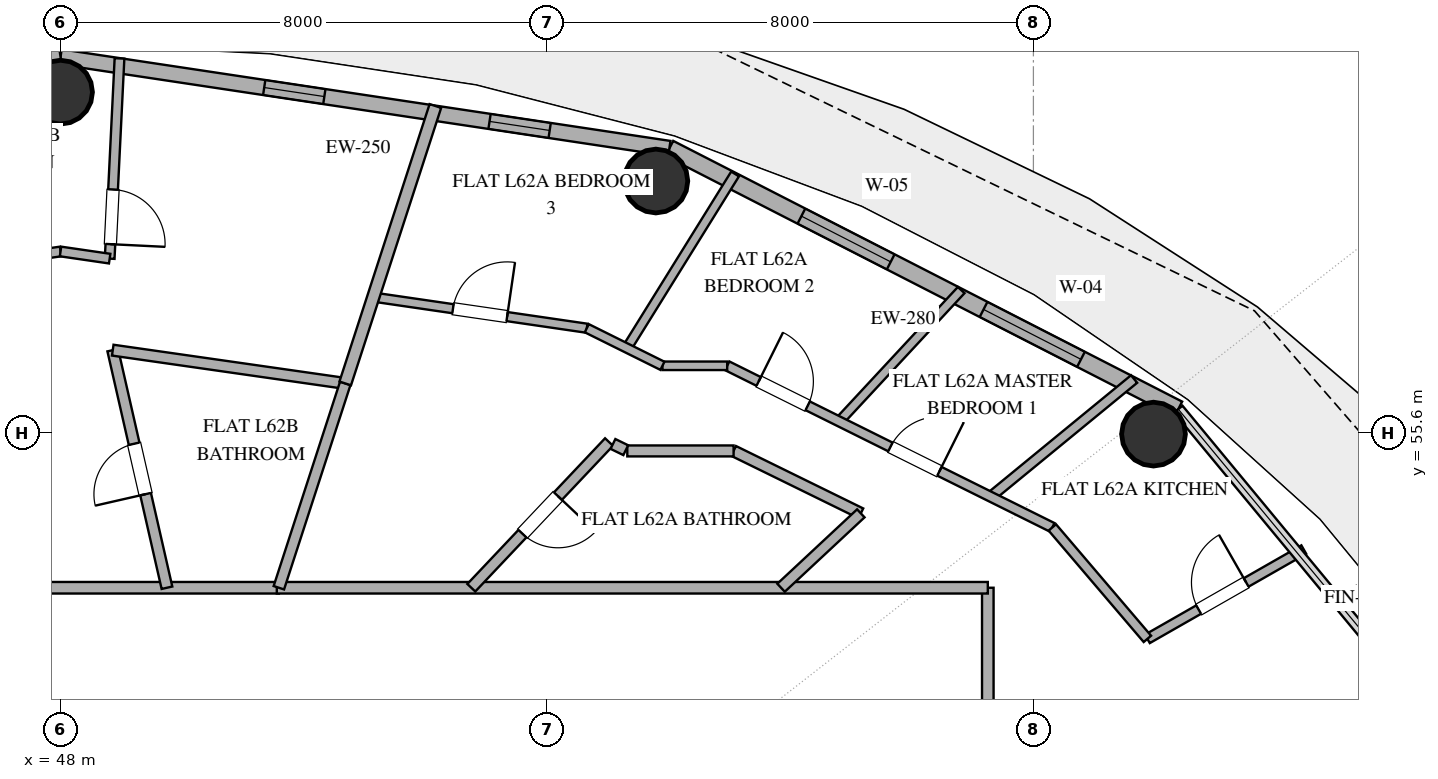
"""IFC4 building model, lengths in metres.
Left out: names, types, materials, properties, quantities, classifications, styles, units other than length and angle.
Written with IfcOpenShell. Run it as: python <this file> out.ifc"""

import sys

from ifc_helpers import new_model, si_unit, direction, frame, frame_2d, origin, origin_2d, place, context, subcontext, project, spatial, rectangle, hollow_circle, extrude, element, fill, save


model = new_model("IFC4")
c1 = context("Model", 3, precision=1e-05, world=origin(), true_north=direction((0.0, 1.0)))
c2 = subcontext(c1, "Body", "Model", "MODEL_VIEW")
j1 = project(units=[si_unit("LENGTHUNIT", "METRE"), si_unit("PLANEANGLEUNIT", "RADIAN")], contexts=[c1])
p1 = place(None, origin())
s1 = spatial("IfcSite", under=j1, at=p1, CompositionType="ELEMENT")
p2 = place(p1, origin())
s2 = spatial("IfcBuilding", under=s1, at=p2, CompositionType="ELEMENT")
p3 = place(p2, frame((0.0, 0.0, 242.4)))
s3 = spatial("IfcBuildingStorey", under=s2, at=p3, CompositionType="ELEMENT", Elevation=242.4)
for number, where, z_axis, x_axis in (
    (1, (65.975, 55.576, 0.0), (0.0, 0.0, 1.0), (1.0, 0.0, 0.0)),
    (2, (57.791, 59.739, 0.0), (0.0, 0.0, 1.0), (1.0, 0.0, 0.0)),
    (3, (48.0, 61.2, 0.0), (0.0, 0.0, 1.0), (1.0, 0.0, 0.0)),
):
    element("IfcColumn", number, at=place(p3, frame(where, z_axis=z_axis, x_axis=x_axis)), inside=s3, PredefinedType="COLUMN", context=c2, shape_type="SweptSolid", body=[
        extrude(hollow_circle(Radius=0.525, WallThickness=0.028, at=origin_2d()), origin(), (0.0, 0.0, 1.0), 3.36),
    ])
p4 = place(p3, frame((66.383, 55.987, 0.0), z_axis=(0.0, 0.0, 1.0), x_axis=(-0.890007394051, 0.455946091699, 0.0)))
e4 = element("IfcWall", 4, at=p4, inside=s3, PredefinedType="SOLIDWALL", context=c2, shape_type="SweptSolid", body=[
    extrude(rectangle(XDim=9.404, YDim=0.28, at=frame_2d((4.702, 0.0))), origin(), (0.0, 0.0, 1.0), 3.36),
])
p5 = place(p4, frame((1.798, 0.0, 0.85)))
e5 = element("IfcOpeningElement", 5, at=p5, cuts=e4, PredefinedType="OPENING", context=c2, shape_type="SweptSolid", body=[
    extrude(rectangle(XDim=1.8, YDim=2.2, at=frame_2d((0.9, 1.1))), frame((0.0, 0.15, 0.0), z_axis=(0.0, -1.0, 0.0), x_axis=(1.0, 0.0, 0.0)), (0.0, 0.0, 1.0), 0.3),
])
p6 = place(p4, frame((5.314, 0.0, 0.85)))
e6 = element("IfcOpeningElement", 6, at=p6, cuts=e4, PredefinedType="OPENING", context=c2, shape_type="SweptSolid", body=[
    extrude(rectangle(XDim=1.65, YDim=2.0, at=frame_2d((0.825, 1.0))), frame((0.0, 0.15, 0.0), z_axis=(0.0, -1.0, 0.0), x_axis=(1.0, 0.0, 0.0)), (0.0, 0.0, 1.0), 0.3),
])
p7 = place(p3, frame((58.013, 60.274, 0.0), z_axis=(0.0, 0.0, 1.0), x_axis=(-0.988882522213, 0.148698881169, 0.0)))
e7 = element("IfcWall", 7, at=p7, inside=s3, PredefinedType="SOLIDWALL", context=c2, shape_type="SweptSolid", body=[
    extrude(rectangle(XDim=10.125, YDim=0.25, at=frame_2d((5.062, 0.0))), origin(), (0.0, 0.0, 1.0), 3.36),
])
p8 = place(p7, frame((1.99, 0.0, 1.42)))
e8 = element("IfcOpeningElement", 8, at=p8, cuts=e7, PredefinedType="OPENING", context=c2, shape_type="SweptSolid", body=[
    extrude(rectangle(XDim=1.0, YDim=1.05, at=frame_2d((0.5, 0.525))), frame((0.0, 0.135, 0.0), z_axis=(0.0, -1.0, 0.0), x_axis=(1.0, 0.0, 0.0)), (0.0, 0.0, 1.0), 0.27),
])
p9 = place(p7, frame((5.738, 0.0, 0.35)))
e9 = element("IfcOpeningElement", 9, at=p9, cuts=e7, PredefinedType="OPENING", context=c2, shape_type="SweptSolid", body=[
    extrude(rectangle(XDim=1.0, YDim=1.05, at=frame_2d((0.5, 0.525))), frame((0.0, 0.135, 0.0), z_axis=(0.0, -1.0, 0.0), x_axis=(1.0, 0.0, 0.0)), (0.0, 0.0, 1.0), 0.27),
])
p10 = place(p3, frame((48.0, 61.78, 0.0), z_axis=(0.0, 0.0, 1.0), x_axis=(-0.988882522213, -0.148698881169, 0.0)))
e10 = element("IfcWall", 10, at=p10, inside=s3, PredefinedType="SOLIDWALL", context=c2, shape_type="SweptSolid", body=[
    extrude(rectangle(XDim=10.125, YDim=0.28, at=frame_2d((5.062, 0.0))), origin(), (0.0, 0.0, 1.0), 3.36),
])
p11 = place(p10, frame((2.769, 0.0, 0.85)))
e11 = element("IfcOpeningElement", 11, at=p11, cuts=e10, PredefinedType="OPENING", context=c2, shape_type="SweptSolid", body=[
    extrude(rectangle(XDim=1.5, YDim=2.0, at=frame_2d((0.75, 1.0))), frame((0.0, 0.15, 0.0), z_axis=(0.0, -1.0, 0.0), x_axis=(1.0, 0.0, 0.0)), (0.0, 0.0, 1.0), 0.3),
])
p12 = place(p10, frame((7.28, 0.0, 0.0)))
e12 = element("IfcOpeningElement", 12, at=p12, cuts=e10, PredefinedType="OPENING", context=c2, shape_type="SweptSolid", body=[
    extrude(rectangle(XDim=1.05, YDim=2.2, at=frame_2d((0.525, 1.1))), frame((0.0, 0.15, 0.0), z_axis=(0.0, -1.0, 0.0), x_axis=(1.0, 0.0, 0.0)), (0.0, 0.0, 1.0), 0.3),
])
p13 = place(p3, frame((32.75, 53.05, 0.0), z_axis=(0.0, 0.0, 1.0), x_axis=(1.0, 0.0, 0.0)))
e13 = element("IfcWall", 13, at=p13, inside=s3, PredefinedType="PARTITIONING", context=c2, shape_type="SweptSolid", body=[
    extrude(rectangle(XDim=18.84, YDim=0.19, at=frame_2d((9.42, 0.0))), origin(), (0.0, 0.0, 1.0), 2.72),
])
p14 = place(p13, frame((11.305, 0.0, 0.0)))
e14 = element("IfcOpeningElement", 14, at=p14, cuts=e13, PredefinedType="OPENING", context=c2, shape_type="SweptSolid", body=[
    extrude(rectangle(XDim=1.0, YDim=2.2, at=frame_2d((0.5, 1.1))), frame((0.0, 0.105, 0.0), z_axis=(0.0, -1.0, 0.0), x_axis=(1.0, 0.0, 0.0)), (0.0, 0.0, 1.0), 0.21),
])
p15 = place(p13, frame((2.829, 0.0, 0.0)))
e15 = element("IfcOpeningElement", 15, at=p15, cuts=e13, PredefinedType="OPENING", context=c2, shape_type="SweptSolid", body=[
    extrude(rectangle(XDim=1.0, YDim=2.2, at=frame_2d((0.5, 1.1))), frame((0.0, 0.105, 0.0), z_axis=(0.0, -1.0, 0.0), x_axis=(1.0, 0.0, 0.0)), (0.0, 0.0, 1.0), 0.21),
])
p16 = place(p3, frame((63.25, 53.05, 0.0), z_axis=(0.0, 0.0, 1.0), x_axis=(0.0, -1.0, 0.0)))
e16 = element("IfcWall", 16, at=p16, inside=s3, PredefinedType="PARTITIONING", context=c2, shape_type="SweptSolid", body=[
    extrude(rectangle(XDim=16.335, YDim=0.19, at=frame_2d((8.167, 0.0))), origin(), (0.0, 0.0, 1.0), 2.72),
])
p17 = place(p16, frame((3.14, 0.0, 0.0)))
e17 = element("IfcOpeningElement", 17, at=p17, cuts=e16, PredefinedType="OPENING", context=c2, shape_type="SweptSolid", body=[
    extrude(rectangle(XDim=1.0, YDim=2.2, at=frame_2d((0.5, 1.1))), frame((0.0, 0.105, 0.0), z_axis=(0.0, -1.0, 0.0), x_axis=(1.0, 0.0, 0.0)), (0.0, 0.0, 1.0), 0.21),
])
p18 = place(p16, frame((10.111, 0.0, 0.0)))
e18 = element("IfcOpeningElement", 18, at=p18, cuts=e16, PredefinedType="OPENING", context=c2, shape_type="SweptSolid", body=[
    extrude(rectangle(XDim=1.0, YDim=2.2, at=frame_2d((0.5, 1.1))), frame((0.0, 0.105, 0.0), z_axis=(0.0, -1.0, 0.0), x_axis=(1.0, 0.0, 0.0)), (0.0, 0.0, 1.0), 0.21),
])
p19 = place(p3, frame((51.557, 53.05, 0.0), z_axis=(0.0, 0.0, 1.0), x_axis=(1.0, 0.0, 0.0)))
e19 = element("IfcWall", 19, at=p19, inside=s3, PredefinedType="PARTITIONING", context=c2, shape_type="SweptSolid", body=[
    extrude(rectangle(XDim=11.693, YDim=0.19, at=frame_2d((5.847, 0.0))), origin(), (0.0, 0.0, 1.0), 2.72),
])
p20 = place(p3, frame((49.75, 53.05, 0.0), z_axis=(0.0, 0.0, 1.0), x_axis=(-0.222474116201, 0.974938596846, 0.0)))
e20 = element("IfcWall", 20, at=p20, inside=s3, PredefinedType="PLUMBINGWALL", context=c2, shape_type="SweptSolid", body=[
    extrude(rectangle(XDim=4.008, YDim=0.18, at=frame_2d((2.004, 0.0))), origin(), (0.0, 0.0, 1.0), 2.72),
])
p21 = place(p20, frame((1.579, 0.0, 0.0)))
e21 = element("IfcOpeningElement", 21, at=p21, cuts=e20, PredefinedType="OPENING", context=c2, shape_type="SweptSolid", body=[
    extrude(rectangle(XDim=0.85, YDim=2.1, at=frame_2d((0.425, 1.05))), frame((0.0, 0.1, 0.0), z_axis=(0.0, -1.0, 0.0), x_axis=(1.0, 0.0, 0.0)), (0.0, 0.0, 1.0), 0.2),
])
p22 = place(p3, frame((48.859, 56.957, 0.0), z_axis=(0.0, 0.0, 1.0), x_axis=(0.989916598229, -0.141651433282, 0.0)))
e22 = element("IfcWall", 22, at=p22, inside=s3, PredefinedType="PLUMBINGWALL", context=c2, shape_type="SweptSolid", body=[
    extrude(rectangle(XDim=3.863, YDim=0.18, at=frame_2d((1.931, 0.0))), origin(), (0.0, 0.0, 1.0), 2.72),
])
p23 = place(p3, frame((53.144, 57.83, 0.0), z_axis=(0.0, 0.0, 1.0), x_axis=(0.98952683964, -0.144348999414, 0.0)))
e23 = element("IfcWall", 23, at=p23, inside=s3, PredefinedType="PARTITIONING", context=c2, shape_type="SweptSolid", body=[
    extrude(rectangle(XDim=3.548, YDim=0.15, at=frame_2d((1.774, 0.0))), origin(), (0.0, 0.0, 1.0), 2.72),
])
p24 = place(p23, frame((1.324, 0.0, 0.0)))
e24 = element("IfcOpeningElement", 24, at=p24, cuts=e23, PredefinedType="OPENING", context=c2, shape_type="SweptSolid", body=[
    extrude(rectangle(XDim=0.9, YDim=2.1, at=frame_2d((0.45, 1.05))), frame((0.0, 0.085, 0.0), z_axis=(0.0, -1.0, 0.0), x_axis=(1.0, 0.0, 0.0)), (0.0, 0.0, 1.0), 0.17),
])
p25 = place(p3, frame((52.682, 56.41, 0.0), z_axis=(0.0, 0.0, 1.0), x_axis=(-0.309025133622, -0.951053871655, 0.0)))
e25 = element("IfcWall", 25, at=p25, inside=s3, PredefinedType="PLUMBINGWALL", context=c2, shape_type="SweptSolid", body=[
    extrude(rectangle(XDim=3.533, YDim=0.18, at=frame_2d((1.767, 0.0))), origin(), (0.0, 0.0, 1.0), 2.72),
])
p26 = place(p3, frame((57.314, 56.99, 0.0), z_axis=(0.0, 0.0, 1.0), x_axis=(0.527732275503, 0.849410763643, 0.0)))
e26 = element("IfcWall", 26, at=p26, inside=s3, PredefinedType="PARTITIONING", context=c2, shape_type="SweptSolid", body=[
    extrude(rectangle(XDim=3.372, YDim=0.15, at=frame_2d((1.686, 0.0))), origin(), (0.0, 0.0, 1.0), 2.72),
])
p27 = place(p3, frame((54.165, 60.973, 0.0), z_axis=(0.0, 0.0, 1.0), x_axis=(-0.309012424199, -0.951058001223, 0.0)))
e27 = element("IfcWall", 27, at=p27, inside=s3, PredefinedType="PARTITIONING", context=c2, shape_type="SweptSolid", body=[
    extrude(rectangle(XDim=4.797, YDim=0.2, at=frame_2d((2.399, 0.0))), origin(), (0.0, 0.0, 1.0), 2.72),
])
p28 = place(p3, frame((57.021, 55.446, 0.0), z_axis=(0.0, 0.0, 1.0), x_axis=(-0.686947406922, -0.726707135044, 0.0)))
e28 = element("IfcWall", 28, at=p28, inside=s3, PredefinedType="PLUMBINGWALL", context=c2, shape_type="SweptSolid", body=[
    extrude(rectangle(XDim=3.297, YDim=0.18, at=frame_2d((1.649, 0.0))), origin(), (0.0, 0.0, 1.0), 2.72),
])
p29 = place(p28, frame((1.224, 0.0, 0.0)))
e29 = element("IfcOpeningElement", 29, at=p29, cuts=e28, PredefinedType="OPENING", context=c2, shape_type="SweptSolid", body=[
    extrude(rectangle(XDim=0.85, YDim=2.1, at=frame_2d((0.425, 1.05))), frame((0.0, 0.1, 0.0), z_axis=(0.0, -1.0, 0.0), x_axis=(1.0, 0.0, 0.0)), (0.0, 0.0, 1.0), 0.2),
])
p30 = place(p3, frame((48.969, 61.755, 0.0), z_axis=(0.0, 0.0, 1.0), x_axis=(-0.04902528139, -0.998797537935, 0.0)))
e30 = element("IfcWall", 30, at=p30, inside=s3, PredefinedType="PLUMBINGWALL", context=c2, shape_type="SweptSolid", body=[
    extrude(rectangle(XDim=3.297, YDim=0.16, at=frame_2d((1.648, 0.0))), origin(), (0.0, 0.0, 1.0), 2.72),
])
p31 = place(p30, frame((2.158, 0.0, 0.0)))
e31 = element("IfcOpeningElement", 31, at=p31, cuts=e30, PredefinedType="OPENING", context=c2, shape_type="SweptSolid", body=[
    extrude(rectangle(XDim=0.9, YDim=2.1, at=frame_2d((0.45, 1.05))), frame((0.0, 0.09, 0.0), z_axis=(0.0, -1.0, 0.0), x_axis=(1.0, 0.0, 0.0)), (0.0, 0.0, 1.0), 0.18),
])
p32 = place(p3, frame((39.345, 57.318, 0.0), z_axis=(0.0, 0.0, 1.0), x_axis=(0.989540121389, 0.144257922351, 0.0)))
e32 = element("IfcWall", 32, at=p32, inside=s3, PredefinedType="PLUMBINGWALL", context=c2, shape_type="SweptSolid", body=[
    extrude(rectangle(XDim=8.746, YDim=0.16, at=frame_2d((4.373, 0.0))), origin(), (0.0, 0.0, 1.0), 2.72),
])
p33 = place(p32, frame((2.686, 0.0, 0.0)))
e33 = element("IfcOpeningElement", 33, at=p33, cuts=e32, PredefinedType="OPENING", context=c2, shape_type="SweptSolid", body=[
    extrude(rectangle(XDim=0.9, YDim=2.1, at=frame_2d((0.45, 1.05))), frame((0.0, 0.09, 0.0), z_axis=(0.0, -1.0, 0.0), x_axis=(1.0, 0.0, 0.0)), (0.0, 0.0, 1.0), 0.18),
])
p34 = place(p32, frame((5.349, 0.0, 0.0)))
e34 = element("IfcOpeningElement", 34, at=p34, cuts=e32, PredefinedType="OPENING", context=c2, shape_type="SweptSolid", body=[
    extrude(rectangle(XDim=0.9, YDim=2.1, at=frame_2d((0.45, 1.05))), frame((0.0, 0.09, 0.0), z_axis=(0.0, -1.0, 0.0), x_axis=(1.0, 0.0, 0.0)), (0.0, 0.0, 1.0), 0.18),
])
p35 = place(p32, frame((0.341, 0.0, 0.0)))
e35 = element("IfcOpeningElement", 35, at=p35, cuts=e32, PredefinedType="OPENING", context=c2, shape_type="SweptSolid", body=[
    extrude(rectangle(XDim=0.9, YDim=2.1, at=frame_2d((0.45, 1.05))), frame((0.0, 0.09, 0.0), z_axis=(0.0, -1.0, 0.0), x_axis=(1.0, 0.0, 0.0)), (0.0, 0.0, 1.0), 0.18),
])
p36 = place(p3, frame((63.296, 54.547, 0.0), z_axis=(0.0, 0.0, 1.0), x_axis=(0.773154828325, 0.634217321931, 0.0)))
e36 = element("IfcWall", 36, at=p36, inside=s3, PredefinedType="PLUMBINGWALL", context=c2, shape_type="SweptSolid", body=[
    extrude(rectangle(XDim=3.052, YDim=0.16, at=frame_2d((1.526, 0.0))), origin(), (0.0, 0.0, 1.0), 2.72),
])
p37 = place(p3, frame((65.875, 52.209, 0.0), z_axis=(0.0, 0.0, 1.0), x_axis=(0.868349640853, 0.495952519128, 0.0)))
e37 = element("IfcWall", 37, at=p37, inside=s3, PredefinedType="PLUMBINGWALL", context=c2, shape_type="SweptSolid", body=[
    extrude(rectangle(XDim=2.962, YDim=0.16, at=frame_2d((1.481, 0.0))), origin(), (0.0, 0.0, 1.0), 2.72),
])
p38 = place(p37, frame((0.971, 0.0, 0.0)))
e38 = element("IfcOpeningElement", 38, at=p38, cuts=e37, PredefinedType="OPENING", context=c2, shape_type="SweptSolid", body=[
    extrude(rectangle(XDim=0.9, YDim=2.1, at=frame_2d((0.45, 1.05))), frame((0.0, 0.09, 0.0), z_axis=(0.0, -1.0, 0.0), x_axis=(1.0, 0.0, 0.0)), (0.0, 0.0, 1.0), 0.18),
])
p39 = place(p3, frame((62.812, 57.945, 0.0), z_axis=(0.0, 0.0, 1.0), x_axis=(-0.680590804007, -0.732663741085, 0.0)))
e39 = element("IfcWall", 39, at=p39, inside=s3, PredefinedType="PARTITIONING", context=c2, shape_type="SweptSolid", body=[
    extrude(rectangle(XDim=2.949, YDim=0.15, at=frame_2d((1.475, 0.0))), origin(), (0.0, 0.0, 1.0), 2.72),
])
p40 = place(p3, frame((58.964, 56.7, 0.0), z_axis=(0.0, 0.0, 1.0), x_axis=(0.895471406875, -0.445119039661, 0.0)))
e40 = element("IfcWall", 40, at=p40, inside=s3, PredefinedType="PLUMBINGWALL", context=c2, shape_type="SweptSolid", body=[
    extrude(rectangle(XDim=5.971, YDim=0.16, at=frame_2d((2.986, 0.0))), origin(), (0.0, 0.0, 1.0), 2.72),
])
p41 = place(p40, frame((2.998, 0.0, 0.0)))
e41 = element("IfcOpeningElement", 41, at=p41, cuts=e40, PredefinedType="OPENING", context=c2, shape_type="SweptSolid", body=[
    extrude(rectangle(XDim=0.9, YDim=2.1, at=frame_2d((0.45, 1.05))), frame((0.0, 0.09, 0.0), z_axis=(0.0, -1.0, 0.0), x_axis=(1.0, 0.0, 0.0)), (0.0, 0.0, 1.0), 0.18),
])
p42 = place(p40, frame((0.578, 0.0, 0.0)))
e42 = element("IfcOpeningElement", 42, at=p42, cuts=e40, PredefinedType="OPENING", context=c2, shape_type="SweptSolid", body=[
    extrude(rectangle(XDim=0.9, YDim=2.1, at=frame_2d((0.45, 1.05))), frame((0.0, 0.09, 0.0), z_axis=(0.0, -1.0, 0.0), x_axis=(1.0, 0.0, 0.0)), (0.0, 0.0, 1.0), 0.18),
])
p43 = place(p3, frame((64.311, 54.042, 0.0), z_axis=(0.0, 0.0, 1.0), x_axis=(0.648953507232, -0.760828065631, 0.0)))
e43 = element("IfcWall", 43, at=p43, inside=s3, PredefinedType="PLUMBINGWALL", context=c2, shape_type="SweptSolid", body=[
    extrude(rectangle(XDim=2.409, YDim=0.16, at=frame_2d((1.205, 0.0))), origin(), (0.0, 0.0, 1.0), 2.72),
])
p44 = place(p3, frame((61.162, 54.273, 0.0), z_axis=(0.0, 0.0, 1.0), x_axis=(-0.897774561906, 0.440455259925, 0.0)))
e44 = element("IfcWall", 44, at=p44, inside=s3, PredefinedType="PLUMBINGWALL", context=c2, shape_type="SweptSolid", body=[
    extrude(rectangle(XDim=2.331, YDim=0.18, at=frame_2d((1.166, 0.0))), origin(), (0.0, 0.0, 1.0), 2.72),
])
p45 = place(p3, frame((59.85, 53.05, 0.0), z_axis=(0.0, 0.0, 1.0), x_axis=(0.731376514485, 0.681973895438, 0.0)))
e45 = element("IfcWall", 45, at=p45, inside=s3, PredefinedType="PLUMBINGWALL", context=c2, shape_type="SweptSolid", body=[
    extrude(rectangle(XDim=1.794, YDim=0.18, at=frame_2d((0.897, 0.0))), origin(), (0.0, 0.0, 1.0), 2.72),
])
p46 = place(p3, frame((59.069, 55.3, 0.0), z_axis=(0.0, 0.0, 1.0), x_axis=(-1.0, 0.0, 0.0)))
e46 = element("IfcWall", 46, at=p46, inside=s3, PredefinedType="PLUMBINGWALL", context=c2, shape_type="SweptSolid", body=[
    extrude(rectangle(XDim=1.748, YDim=0.18, at=frame_2d((0.874, 0.0))), origin(), (0.0, 0.0, 1.0), 2.72),
])
p47 = place(p3, frame((58.964, 56.7, 0.0), z_axis=(0.0, 0.0, 1.0), x_axis=(-1.0, 0.0, 0.0)))
e47 = element("IfcWall", 47, at=p47, inside=s3, PredefinedType="PARTITIONING", context=c2, shape_type="SweptSolid", body=[
    extrude(rectangle(XDim=1.065, YDim=0.14, at=frame_2d((0.533, 0.0))), origin(), (0.0, 0.0, 1.0), 2.72),
])
p48 = place(p3, frame((48.808, 58.462, 0.0), z_axis=(0.0, 0.0, 1.0), x_axis=(-0.989514290885, 0.144434996222, 0.0)))
e48 = element("IfcWall", 48, at=p48, inside=s3, PredefinedType="PLUMBINGWALL", context=c2, shape_type="SweptSolid", body=[
    extrude(rectangle(XDim=0.816, YDim=0.16, at=frame_2d((0.408, 0.0))), origin(), (0.0, 0.0, 1.0), 2.72),
])
p49 = place(p3, frame((56.655, 57.318, 0.0), z_axis=(0.0, 0.0, 1.0), x_axis=(0.895584310315, -0.444891833053, 0.0)))
e49 = element("IfcWall", 49, at=p49, inside=s3, PredefinedType="PARTITIONING", context=c2, shape_type="SweptSolid", body=[
    extrude(rectangle(XDim=1.389, YDim=0.15, at=frame_2d((0.694, 0.0))), origin(), (0.0, 0.0, 1.0), 2.72),
])
p50 = place(p3, frame((57.296, 55.312, 0.0), z_axis=(0.0, 0.0, 1.0), x_axis=(-0.898768445644, 0.438423632021, 0.0)))
e50 = element("IfcWall", 50, at=p50, inside=s3, PredefinedType="PLUMBINGWALL", context=c2, shape_type="SweptSolid", body=[
    extrude(rectangle(XDim=0.234, YDim=0.18, at=frame_2d((0.117, 0.0))), origin(), (0.0, 0.0, 1.0), 2.72),
])
p51 = place(p5, origin())
e51 = element("IfcWindow", 51, at=p51, inside=s3, PartitioningType="SINGLE_PANEL", PredefinedType="WINDOW", context=c2, shape_type="SweptSolid", body=[
    extrude(rectangle(XDim=1.8, YDim=2.2, at=frame_2d((0.9, 1.1))), frame((0.0, 0.03, 0.0), z_axis=(0.0, -1.0, 0.0), x_axis=(1.0, 0.0, 0.0)), (0.0, 0.0, 1.0), 0.06),
])
fill(e5, e51)
p52 = place(p6, origin())
e52 = element("IfcWindow", 52, at=p52, inside=s3, PartitioningType="SINGLE_PANEL", PredefinedType="WINDOW", context=c2, shape_type="SweptSolid", body=[
    extrude(rectangle(XDim=1.65, YDim=2.0, at=frame_2d((0.825, 1.0))), frame((0.0, 0.03, 0.0), z_axis=(0.0, -1.0, 0.0), x_axis=(1.0, 0.0, 0.0)), (0.0, 0.0, 1.0), 0.06),
])
fill(e6, e52)
p53 = place(p8, origin())
e53 = element("IfcWindow", 53, at=p53, inside=s3, PartitioningType="SINGLE_PANEL", PredefinedType="WINDOW", context=c2, shape_type="SweptSolid", body=[
    extrude(rectangle(XDim=1.0, YDim=1.05, at=frame_2d((0.5, 0.525))), frame((0.0, 0.03, 0.0), z_axis=(0.0, -1.0, 0.0), x_axis=(1.0, 0.0, 0.0)), (0.0, 0.0, 1.0), 0.06),
])
fill(e8, e53)
p54 = place(p9, origin())
e54 = element("IfcWindow", 54, at=p54, inside=s3, PartitioningType="SINGLE_PANEL", PredefinedType="WINDOW", context=c2, shape_type="SweptSolid", body=[
    extrude(rectangle(XDim=1.0, YDim=1.05, at=frame_2d((0.5, 0.525))), frame((0.0, 0.03, 0.0), z_axis=(0.0, -1.0, 0.0), x_axis=(1.0, 0.0, 0.0)), (0.0, 0.0, 1.0), 0.06),
])
fill(e9, e54)
p55 = place(p21, origin())
e55 = element("IfcDoor", 55, at=p55, inside=s3, OperationType="SINGLE_SWING_LEFT", PredefinedType="DOOR", context=c2, shape_type="SweptSolid", body=[
    extrude(rectangle(XDim=0.85, YDim=2.1, at=frame_2d((0.425, 1.05))), frame((0.0, 0.025, 0.0), z_axis=(0.0, -1.0, 0.0), x_axis=(1.0, 0.0, 0.0)), (0.0, 0.0, 1.0), 0.05),
])
fill(e21, e55)
p56 = place(p24, origin())
e56 = element("IfcDoor", 56, at=p56, inside=s3, OperationType="SINGLE_SWING_RIGHT", PredefinedType="DOOR", context=c2, shape_type="SweptSolid", body=[
    extrude(rectangle(XDim=0.9, YDim=2.1, at=frame_2d((0.45, 1.05))), frame((0.0, 0.025, 0.0), z_axis=(0.0, -1.0, 0.0), x_axis=(1.0, 0.0, 0.0)), (0.0, 0.0, 1.0), 0.05),
])
fill(e24, e56)
p57 = place(p29, origin())
e57 = element("IfcDoor", 57, at=p57, inside=s3, OperationType="SINGLE_SWING_LEFT", PredefinedType="DOOR", context=c2, shape_type="SweptSolid", body=[
    extrude(rectangle(XDim=0.85, YDim=2.1, at=frame_2d((0.425, 1.05))), frame((0.0, 0.025, 0.0), z_axis=(0.0, -1.0, 0.0), x_axis=(1.0, 0.0, 0.0)), (0.0, 0.0, 1.0), 0.05),
])
fill(e29, e57)
p58 = place(p31, origin())
e58 = element("IfcDoor", 58, at=p58, inside=s3, OperationType="SINGLE_SWING_RIGHT", PredefinedType="DOOR", context=c2, shape_type="SweptSolid", body=[
    extrude(rectangle(XDim=0.9, YDim=2.1, at=frame_2d((0.45, 1.05))), frame((0.0, 0.025, 0.0), z_axis=(0.0, -1.0, 0.0), x_axis=(1.0, 0.0, 0.0)), (0.0, 0.0, 1.0), 0.05),
])
fill(e31, e58)
p59 = place(p38, origin())
e59 = element("IfcDoor", 59, at=p59, inside=s3, OperationType="SINGLE_SWING_RIGHT", PredefinedType="DOOR", context=c2, shape_type="SweptSolid", body=[
    extrude(rectangle(XDim=0.9, YDim=2.1, at=frame_2d((0.45, 1.05))), frame((0.0, 0.025, 0.0), z_axis=(0.0, -1.0, 0.0), x_axis=(1.0, 0.0, 0.0)), (0.0, 0.0, 1.0), 0.05),
])
fill(e38, e59)
p60 = place(p41, origin())
e60 = element("IfcDoor", 60, at=p60, inside=s3, OperationType="SINGLE_SWING_RIGHT", PredefinedType="DOOR", context=c2, shape_type="SweptSolid", body=[
    extrude(rectangle(XDim=0.9, YDim=2.1, at=frame_2d((0.45, 1.05))), frame((0.0, 0.025, 0.0), z_axis=(0.0, -1.0, 0.0), x_axis=(1.0, 0.0, 0.0)), (0.0, 0.0, 1.0), 0.05),
])
fill(e41, e60)
p61 = place(p42, origin())
e61 = element("IfcDoor", 61, at=p61, inside=s3, OperationType="SINGLE_SWING_LEFT", PredefinedType="DOOR", context=c2, shape_type="SweptSolid", body=[
    extrude(rectangle(XDim=0.9, YDim=2.1, at=frame_2d((0.45, 1.05))), frame((0.0, 0.025, 0.0), z_axis=(0.0, -1.0, 0.0), x_axis=(1.0, 0.0, 0.0)), (0.0, 0.0, 1.0), 0.05),
])
fill(e42, e61)
save(model, sys.argv[1])
